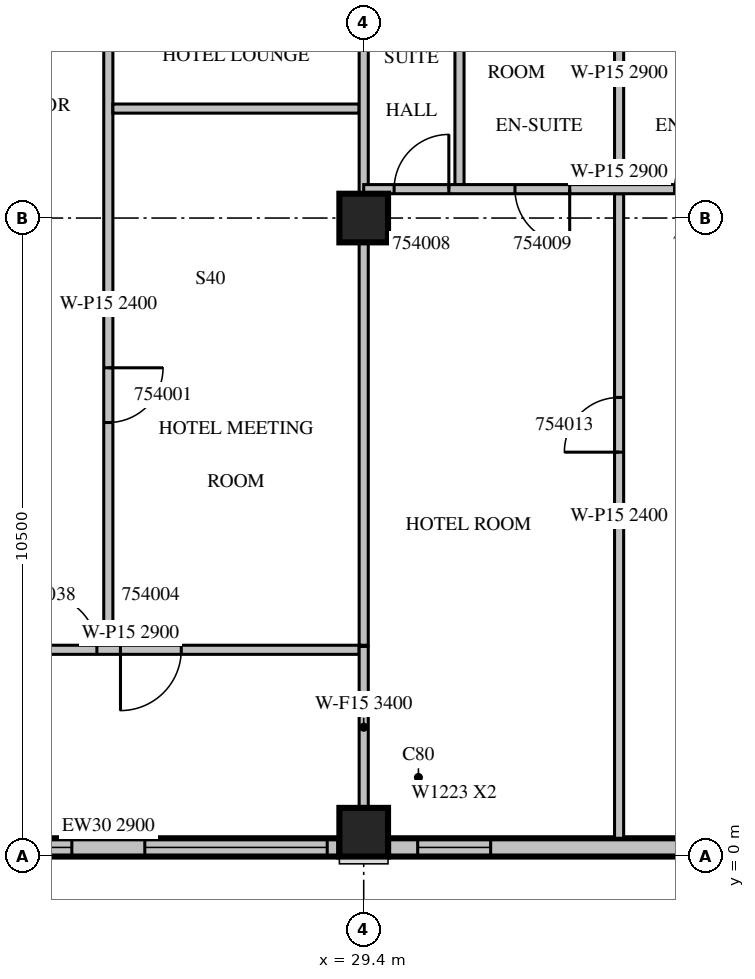
"""IFC4 building model, lengths in metres.
Left out: names, types, materials, properties, quantities, classifications, styles, units other than length and angle.
Written with IfcOpenShell. Run it as: python <this file> out.ifc"""

import sys

from ifc_helpers import new_model, si_unit, direction, frame, frame_2d, origin, origin_2d, place, context, subcontext, project, spatial, rectangle, extrude, source, transform, mapped, element, fill, save


model = new_model("IFC4")
c1 = context("Model", 3, precision=1e-05, world=origin(), true_north=direction((0.0, 1.0)))
c2 = subcontext(c1, "Body", "Model", "MODEL_VIEW")
j1 = project(units=[si_unit("LENGTHUNIT", "METRE"), si_unit("PLANEANGLEUNIT", "RADIAN")], contexts=[c1])
p1 = place(None, origin())
s1 = spatial("IfcSite", under=j1, at=p1, CompositionType="ELEMENT")
p2 = place(p1, origin())
s2 = spatial("IfcBuilding", under=s1, at=p2, CompositionType="ELEMENT")
p3 = place(p2, frame((0.0, 0.0, 238.6)))
s3 = spatial("IfcBuildingStorey", under=s2, at=p3, CompositionType="ELEMENT", Elevation=238.6)
m1 = source(origin(), c2, "Body", "SweptSolid", [
    extrude(rectangle(XDim=0.8, YDim=0.8, at=origin_2d()), origin(), (0.0, 0.0, 1.0), 3.8),
])
for number, where, z_axis, x_axis in (
    (1, (29.4, 0.4, 0.0), (0.0, 0.0, 1.0), (1.0, 0.0, 0.0)),
    (2, (29.4, 10.5, 0.0), (0.0, 0.0, 1.0), (1.0, 0.0, 0.0)),
):
    element("IfcColumn", number, at=place(p3, frame(where, z_axis=z_axis, x_axis=x_axis)), inside=s3, PredefinedType="COLUMN", context=c2, shape_type="MappedRepresentation", body=[
        mapped(m1, transform((0.0, 0.0, 0.0), scale=1.0)),
    ])
m2 = source(origin(), c2, "Body", "SweptSolid", [
    extrude(rectangle(XDim=7.6, YDim=0.3, at=frame_2d((3.8, 0.0))), origin(), (0.0, 0.0, 1.0), 2.9),
])
p4 = place(p3, frame((21.4, 0.15, 0.0), z_axis=(0.0, 0.0, 1.0), x_axis=(1.0, 0.0, 0.0)))
e3 = element("IfcWall", 3, at=p4, inside=s3, PredefinedType="STANDARD", context=c2, shape_type="MappedRepresentation", body=[
    mapped(m2, transform((0.0, 0.0, 0.0), scale=1.0)),
])
m3 = source(origin(), c2, "Body", "SweptSolid", [
    extrude(rectangle(XDim=3.0, YDim=2.3, at=frame_2d((1.5, 1.15))), frame((0.0, 0.16, 0.0), z_axis=(0.0, -1.0, 0.0), x_axis=(1.0, 0.0, 0.0)), (0.0, 0.0, 1.0), 0.32),
])
p5 = place(p4, frame((0.2, 0.0, 0.6)))
e4 = element("IfcOpeningElement", 4, at=p5, cuts=e3, PredefinedType="OPENING", context=c2, shape_type="MappedRepresentation", body=[
    mapped(m3, transform((0.0, 0.0, 0.0), scale=1.0)),
])
p6 = place(p4, frame((4.4, 0.0, 0.6)))
e5 = element("IfcOpeningElement", 5, at=p6, cuts=e3, PredefinedType="OPENING", context=c2, shape_type="MappedRepresentation", body=[
    mapped(m3, transform((0.0, 0.0, 0.0), scale=1.0)),
])
m4 = source(origin(), c2, "Body", "SweptSolid", [
    extrude(rectangle(XDim=7.6, YDim=0.3, at=frame_2d((3.8, 0.0))), origin(), (0.0, 0.0, 1.0), 3.4),
])
p7 = place(p3, frame((29.8, 0.15, 0.0), z_axis=(0.0, 0.0, 1.0), x_axis=(1.0, 0.0, 0.0)))
e6 = element("IfcWall", 6, at=p7, inside=s3, PredefinedType="STANDARD", context=c2, shape_type="MappedRepresentation", body=[
    mapped(m4, transform((0.0, 0.0, 0.0), scale=1.0)),
])
m5 = source(origin(), c2, "Body", "SweptSolid", [
    extrude(rectangle(XDim=1.2, YDim=2.3, at=frame_2d((0.6, 1.15))), frame((0.0, 0.16, 0.0), z_axis=(0.0, -1.0, 0.0), x_axis=(1.0, 0.0, 0.0)), (0.0, 0.0, 1.0), 0.32),
])
p8 = place(p7, frame((0.487, 0.0, 0.6)))
e7 = element("IfcOpeningElement", 7, at=p8, cuts=e6, PredefinedType="OPENING", context=c2, shape_type="MappedRepresentation", body=[
    mapped(m5, transform((0.0, 0.0, 0.0), scale=1.0)),
])
p9 = place(p7, frame((6.013, 0.0, 0.6)))
e8 = element("IfcOpeningElement", 8, at=p9, cuts=e6, PredefinedType="OPENING", context=c2, shape_type="MappedRepresentation", body=[
    mapped(m5, transform((0.0, 0.0, 0.0), scale=1.0)),
])
m6 = source(origin(), c2, "Body", "SweptSolid", [
    extrude(rectangle(XDim=11.225, YDim=0.15, at=frame_2d((5.612, 0.0))), origin(), (0.0, 0.0, 1.0), 2.4),
])
p10 = place(p3, frame((25.2, 14.7, 0.0), z_axis=(0.0, 0.0, 1.0), x_axis=(0.0, -1.0, 0.0)))
e9 = element("IfcWall", 9, at=p10, inside=s3, PredefinedType="PARTITIONING", context=c2, shape_type="MappedRepresentation", body=[
    mapped(m6, transform((0.0, 0.0, 0.0), scale=1.0)),
])
m7 = source(origin(), c2, "Body", "SweptSolid", [
    extrude(rectangle(XDim=0.9, YDim=2.1, at=frame_2d((0.45, 1.05))), frame((0.0, 0.085, 0.0), z_axis=(0.0, -1.0, 0.0), x_axis=(1.0, 0.0, 0.0)), (0.0, 0.0, 1.0), 0.17),
])
p11 = place(p10, frame((6.662, 0.0, 0.0)))
e10 = element("IfcOpeningElement", 10, at=p11, cuts=e9, PredefinedType="OPENING", context=c2, shape_type="MappedRepresentation", body=[
    mapped(m7, transform((0.0, 0.0, 0.0), scale=1.0)),
])
p12 = place(p10, frame((0.175, 0.0, 0.0)))
e11 = element("IfcOpeningElement", 11, at=p12, cuts=e9, PredefinedType="OPENING", context=c2, shape_type="MappedRepresentation", body=[
    mapped(m7, transform((0.0, 0.0, 0.0), scale=1.0)),
])
m8 = source(origin(), c2, "Body", "SweptSolid", [
    extrude(rectangle(XDim=4.05, YDim=0.15, at=frame_2d((2.025, 0.0))), origin(), (0.0, 0.0, 1.0), 3.4),
])
p13 = place(p3, frame((29.325, 12.3, 0.0), z_axis=(0.0, 0.0, 1.0), x_axis=(-1.0, 0.0, 0.0)))
e12 = element("IfcWall", 12, at=p13, inside=s3, PredefinedType="PARTITIONING", context=c2, shape_type="MappedRepresentation", body=[
    mapped(m8, transform((0.0, 0.0, 0.0), scale=1.0)),
])
m9 = source(origin(), c2, "Body", "SweptSolid", [
    extrude(rectangle(XDim=6.626, YDim=0.15, at=frame_2d((3.313, 0.0))), origin(), (0.0, 0.0, 1.0), 3.4),
])
p14 = place(p3, frame((29.4, 3.475, 0.0), z_axis=(0.0, 0.0, 1.0), x_axis=(0.0, 1.0, 0.0)))
e13 = element("IfcWall", 13, at=p14, inside=s3, PredefinedType="PARTITIONING", context=c2, shape_type="MappedRepresentation", body=[
    mapped(m9, transform((0.0, 0.0, 0.0), scale=1.0)),
])
p15 = place(p3, frame((29.4, 10.899, 0.0), z_axis=(0.0, 0.0, 1.0), x_axis=(0.0, 1.0, 0.0)))
e14 = element("IfcWall", 14, at=p15, inside=s3, PredefinedType="PARTITIONING", context=c2, shape_type="SweptSolid", body=[
    extrude(rectangle(XDim=3.801, YDim=0.15, at=frame_2d((1.901, 0.0))), origin(), (0.0, 0.0, 1.0), 3.4),
])
m10 = source(origin(), c2, "Body", "SweptSolid", [
    extrude(rectangle(XDim=7.525, YDim=0.15, at=frame_2d((3.763, 0.0))), origin(), (0.0, 0.0, 1.0), 2.9),
])
p16 = place(p3, frame((21.8, 3.4, 0.0), z_axis=(0.0, 0.0, 1.0), x_axis=(1.0, 0.0, 0.0)))
e15 = element("IfcWall", 15, at=p16, inside=s3, PredefinedType="PARTITIONING", context=c2, shape_type="MappedRepresentation", body=[
    mapped(m10, transform((0.0, 0.0, 0.0), scale=1.0)),
])
m11 = source(origin(), c2, "Body", "SweptSolid", [
    extrude(rectangle(XDim=1.0, YDim=2.1, at=frame_2d((0.5, 1.05))), frame((0.0, 0.085, 0.0), z_axis=(0.0, -1.0, 0.0), x_axis=(1.0, 0.0, 0.0)), (0.0, 0.0, 1.0), 0.17),
])
p17 = place(p16, frame((3.6, 0.0, 0.0)))
e16 = element("IfcOpeningElement", 16, at=p17, cuts=e15, PredefinedType="OPENING", context=c2, shape_type="MappedRepresentation", body=[
    mapped(m11, transform((0.0, 0.0, 0.0), scale=1.0)),
])
p18 = place(p16, frame((2.312, 0.0, 0.0)))
e17 = element("IfcOpeningElement", 17, at=p18, cuts=e15, PredefinedType="OPENING", context=c2, shape_type="MappedRepresentation", body=[
    mapped(m7, transform((0.0, 0.0, 0.0), scale=1.0)),
])
m12 = source(origin(), c2, "Body", "SweptSolid", [
    extrude(rectangle(XDim=10.6, YDim=0.15, at=frame_2d((5.3, 0.0))), origin(), (0.0, 0.0, 1.0), 2.4),
])
p19 = place(p3, frame((33.6, 0.3, 0.0), z_axis=(0.0, 0.0, 1.0), x_axis=(0.0, 1.0, 0.0)))
e18 = element("IfcWall", 18, at=p19, inside=s3, PredefinedType="PARTITIONING", context=c2, shape_type="MappedRepresentation", body=[
    mapped(m12, transform((0.0, 0.0, 0.0), scale=1.0)),
])
p20 = place(p19, frame((6.35, 0.0, 0.0)))
e19 = element("IfcOpeningElement", 19, at=p20, cuts=e18, PredefinedType="OPENING", context=c2, shape_type="MappedRepresentation", body=[
    mapped(m7, transform((0.0, 0.0, 0.0), scale=1.0)),
])
p21 = place(p3, frame((30.975, 11.05, 0.0), z_axis=(0.0, 0.0, 1.0), x_axis=(0.0, 1.0, 0.0)))
e20 = element("IfcWall", 20, at=p21, inside=s3, PredefinedType="PARTITIONING", context=c2, shape_type="SweptSolid", body=[
    extrude(rectangle(XDim=3.65, YDim=0.15, at=frame_2d((1.825, 0.0))), origin(), (0.0, 0.0, 1.0), 3.4),
])
p22 = place(p3, frame((33.6, 11.05, 0.0), z_axis=(0.0, 0.0, 1.0), x_axis=(0.0, 1.0, 0.0)))
e21 = element("IfcWall", 21, at=p22, inside=s3, PredefinedType="PARTITIONING", context=c2, shape_type="SweptSolid", body=[
    extrude(rectangle(XDim=3.65, YDim=0.15, at=frame_2d((1.825, 0.0))), origin(), (0.0, 0.0, 1.0), 2.9),
])
m13 = source(origin(), c2, "Body", "SweptSolid", [
    extrude(rectangle(XDim=2.656, YDim=0.15, at=frame_2d((1.328, 0.0))), origin(), (0.0, 0.0, 1.0), 3.4),
])
p23 = place(p3, frame((29.4, 0.799, 0.0), z_axis=(0.0, 0.0, 1.0), x_axis=(0.0, 1.0, 0.0)))
e22 = element("IfcWall", 22, at=p23, inside=s3, PredefinedType="PARTITIONING", context=c2, shape_type="MappedRepresentation", body=[
    mapped(m13, transform((0.0, 0.0, 0.0), scale=1.0)),
])
m14 = source(origin(), c2, "Body", "SweptSolid", [
    extrude(rectangle(XDim=8.4, YDim=0.15, at=frame_2d((4.2, 0.0))), origin(), (0.0, 0.0, 1.0), 2.9),
])
p24 = place(p3, frame((37.8, 10.975, 0.0), z_axis=(0.0, 0.0, 1.0), x_axis=(-1.0, 0.0, 0.0)))
e23 = element("IfcWall", 23, at=p24, inside=s3, PredefinedType="PARTITIONING", context=c2, shape_type="MappedRepresentation", body=[
    mapped(m14, transform((0.0, 0.0, 0.0), scale=1.0)),
])
p25 = place(p24, frame((7.0, 0.0, 0.0)))
e24 = element("IfcOpeningElement", 24, at=p25, cuts=e23, PredefinedType="OPENING", context=c2, shape_type="MappedRepresentation", body=[
    mapped(m7, transform((0.0, 0.0, 0.0), scale=1.0)),
])
p26 = place(p24, frame((5.013, 0.0, 0.0)))
e25 = element("IfcOpeningElement", 25, at=p26, cuts=e23, PredefinedType="OPENING", context=c2, shape_type="MappedRepresentation", body=[
    mapped(m7, transform((0.0, 0.0, 0.0), scale=1.0)),
])
p27 = place(p24, frame((2.388, 0.0, 0.0)))
e26 = element("IfcOpeningElement", 26, at=p27, cuts=e23, PredefinedType="OPENING", context=c2, shape_type="MappedRepresentation", body=[
    mapped(m7, transform((0.0, 0.0, 0.0), scale=1.0)),
])
p28 = place(p24, frame((0.46, 0.0, 0.0)))
e27 = element("IfcOpeningElement", 27, at=p28, cuts=e23, PredefinedType="OPENING", context=c2, shape_type="MappedRepresentation", body=[
    mapped(m7, transform((0.0, 0.0, 0.0), scale=1.0)),
])
m15 = source(origin(), c2, "Body", "SweptSolid", [
    extrude(rectangle(XDim=3.0, YDim=2.3, at=frame_2d((1.5, 1.15))), frame((0.0, 0.03, 0.0), z_axis=(0.0, -1.0, 0.0), x_axis=(1.0, 0.0, 0.0)), (0.0, 0.0, 1.0), 0.06),
])
p29 = place(p5, origin())
e28 = element("IfcWindow", 28, at=p29, inside=s3, PartitioningType="SINGLE_PANEL", PredefinedType="WINDOW", context=c2, shape_type="MappedRepresentation", body=[
    mapped(m15, transform((0.0, 0.0, 0.0), scale=1.0)),
])
fill(e4, e28)
p30 = place(p6, origin())
e29 = element("IfcWindow", 29, at=p30, inside=s3, PartitioningType="SINGLE_PANEL", PredefinedType="WINDOW", context=c2, shape_type="MappedRepresentation", body=[
    mapped(m15, transform((0.0, 0.0, 0.0), scale=1.0)),
])
fill(e5, e29)
m16 = source(origin(), c2, "Body", "SweptSolid", [
    extrude(rectangle(XDim=1.2, YDim=2.3, at=frame_2d((0.6, 1.15))), frame((0.0, 0.03, 0.0), z_axis=(0.0, -1.0, 0.0), x_axis=(1.0, 0.0, 0.0)), (0.0, 0.0, 1.0), 0.06),
])
p31 = place(p8, origin())
e30 = element("IfcWindow", 30, at=p31, inside=s3, PartitioningType="SINGLE_PANEL", PredefinedType="WINDOW", context=c2, shape_type="MappedRepresentation", body=[
    mapped(m16, transform((0.0, 0.0, 0.0), scale=1.0)),
])
fill(e7, e30)
m17 = source(origin(), c2, "Body", "SweptSolid", [
    extrude(rectangle(XDim=0.9, YDim=2.1, at=frame_2d((0.45, 1.05))), frame((0.0, 0.025, 0.0), z_axis=(0.0, -1.0, 0.0), x_axis=(1.0, 0.0, 0.0)), (0.0, 0.0, 1.0), 0.05),
])
p32 = place(p11, origin())
e31 = element("IfcDoor", 31, at=p32, inside=s3, OperationType="SINGLE_SWING_LEFT", PredefinedType="DOOR", context=c2, shape_type="MappedRepresentation", body=[
    mapped(m17, transform((0.0, 0.0, 0.0), scale=1.0)),
])
fill(e10, e31)
m18 = source(origin(), c2, "Body", "SweptSolid", [
    extrude(rectangle(XDim=1.0, YDim=2.1, at=frame_2d((0.5, 1.05))), frame((0.0, 0.025, 0.0), z_axis=(0.0, -1.0, 0.0), x_axis=(1.0, 0.0, 0.0)), (0.0, 0.0, 1.0), 0.05),
])
p33 = place(p17, origin())
e32 = element("IfcDoor", 32, at=p33, inside=s3, OperationType="SINGLE_SWING_RIGHT", PredefinedType="DOOR", context=c2, shape_type="MappedRepresentation", body=[
    mapped(m18, transform((0.0, 0.0, 0.0), scale=1.0)),
])
fill(e16, e32)
p34 = place(p25, origin())
e33 = element("IfcDoor", 33, at=p34, inside=s3, OperationType="SINGLE_SWING_RIGHT", PredefinedType="DOOR", context=c2, shape_type="MappedRepresentation", body=[
    mapped(m17, transform((0.0, 0.0, 0.0), scale=1.0)),
])
fill(e24, e33)
p35 = place(p26, origin())
e34 = element("IfcDoor", 34, at=p35, inside=s3, OperationType="SINGLE_SWING_LEFT", PredefinedType="DOOR", context=c2, shape_type="MappedRepresentation", body=[
    mapped(m17, transform((0.0, 0.0, 0.0), scale=1.0)),
])
fill(e25, e34)
p36 = place(p27, origin())
e35 = element("IfcDoor", 35, at=p36, inside=s3, OperationType="SINGLE_SWING_RIGHT", PredefinedType="DOOR", context=c2, shape_type="MappedRepresentation", body=[
    mapped(m17, transform((0.0, 0.0, 0.0), scale=1.0)),
])
fill(e26, e35)
p37 = place(p20, origin())
e36 = element("IfcDoor", 36, at=p37, inside=s3, OperationType="SINGLE_SWING_LEFT", PredefinedType="DOOR", context=c2, shape_type="MappedRepresentation", body=[
    mapped(m17, transform((0.0, 0.0, 0.0), scale=1.0)),
])
fill(e19, e36)
p38 = place(p18, origin())
e37 = element("IfcDoor", 37, at=p38, inside=s3, OperationType="SINGLE_SWING_LEFT", PredefinedType="DOOR", context=c2, shape_type="MappedRepresentation", body=[
    mapped(m17, transform((0.0, 0.0, 0.0), scale=1.0)),
])
fill(e17, e37)
save(model, sys.argv[1])
